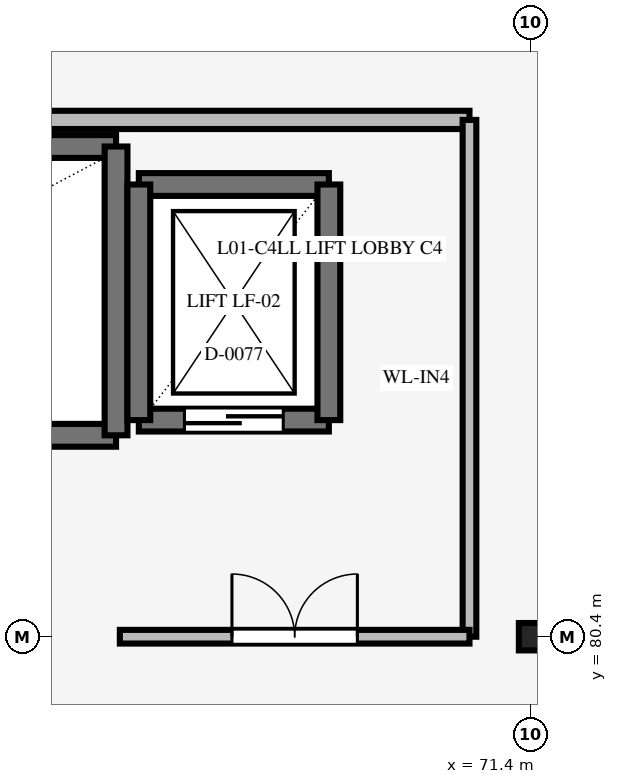
"""IFC4 building model, lengths in metres.
Left out: names, types, materials, properties, quantities, classifications, styles, units other than length and angle.
Written with IfcOpenShell. Run it as: python <this file> out.ifc"""

import sys

from ifc_helpers import new_model, si_unit, direction, frame, frame_2d, origin, origin_2d, place, context, subcontext, project, spatial, rectangle, i_section, extrude, element, fill, save


model = new_model("IFC4")
c1 = context("Model", 3, precision=1e-05, world=origin(), true_north=direction((0.0, 1.0)))
c2 = subcontext(c1, "Body", "Model", "MODEL_VIEW")
j1 = project(units=[si_unit("LENGTHUNIT", "METRE"), si_unit("PLANEANGLEUNIT", "RADIAN")], contexts=[c1])
p1 = place(None, origin())
s1 = spatial("IfcSite", under=j1, at=p1, CompositionType="ELEMENT")
p2 = place(p1, origin())
s2 = spatial("IfcBuilding", under=s1, at=p2, CompositionType="ELEMENT")
p3 = place(p2, frame((0.0, 0.0, 6.0)))
s3 = spatial("IfcBuildingStorey", under=s2, at=p3, CompositionType="ELEMENT", Elevation=6.0)
p4 = place(p3, frame((71.4, 80.4, 0.0), z_axis=(0.0, 0.0, 1.0), x_axis=(1.0, 0.0, 0.0)))
e1 = element("IfcColumn", 1, at=p4, inside=s3, PredefinedType="COLUMN", context=c2, shape_type="SweptSolid", body=[
    extrude(i_section(OverallWidth=0.3, OverallDepth=0.36, WebThickness=0.012, FlangeThickness=0.022, FilletRadius=0.027, at=origin_2d()), origin(), (0.0, 0.0, 1.0), 6.0),
])
for number, where, z_axis, x_axis in (
    (2, (65.95, 83.05, 0.0), (0.0, 0.0, 1.0), (-1.0, 0.0, 0.0)),
    (3, (56.45, 86.85, 0.0), (0.0, 0.0, 1.0), (1.0, 0.0, 0.0)),
):
    element("IfcWall", number, at=place(p3, frame(where, z_axis=z_axis, x_axis=x_axis)), inside=s3, PredefinedType="SHEAR", context=c2, shape_type="SweptSolid", body=[
        extrude(rectangle(XDim=9.5, YDim=0.3, at=frame_2d((4.75, 0.0))), origin(), (0.0, 0.0, 1.0), 6.0),
    ])
p5 = place(p3, frame((65.95, 83.05, 0.0), z_axis=(0.0, 0.0, 1.0), x_axis=(0.0, 1.0, 0.0)))
e4 = element("IfcWall", 4, at=p5, inside=s3, PredefinedType="SHEAR", context=c2, shape_type="SweptSolid", body=[
    extrude(rectangle(XDim=3.8, YDim=0.3, at=frame_2d((1.9, 0.0))), origin(), (0.0, 0.0, 1.0), 6.0),
])
p6 = place(p3, frame((66.25, 83.25, 0.0), z_axis=(0.0, 0.0, 1.0), x_axis=(1.0, 0.0, 0.0)))
e5 = element("IfcWall", 5, at=p6, inside=s3, PredefinedType="SHEAR", context=c2, shape_type="SweptSolid", body=[
    extrude(rectangle(XDim=2.5, YDim=0.3, at=frame_2d((1.25, 0.0))), origin(), (0.0, 0.0, 1.0), 5.64),
])
p7 = place(p6, frame((0.6, 0.0, 0.0)))
e6 = element("IfcOpeningElement", 6, at=p7, cuts=e5, PredefinedType="OPENING", context=c2, shape_type="SweptSolid", body=[
    extrude(rectangle(XDim=1.3, YDim=2.2, at=frame_2d((0.65, 1.1))), frame((0.0, 0.16, 0.0), z_axis=(0.0, -1.0, 0.0), x_axis=(1.0, 0.0, 0.0)), (0.0, 0.0, 1.0), 0.32),
])
p8 = place(p3, frame((66.25, 86.35, 0.0), z_axis=(0.0, 0.0, 1.0), x_axis=(1.0, 0.0, 0.0)))
e7 = element("IfcWall", 7, at=p8, inside=s3, PredefinedType="SHEAR", context=c2, shape_type="SweptSolid", body=[
    extrude(rectangle(XDim=2.5, YDim=0.3, at=frame_2d((1.25, 0.0))), origin(), (0.0, 0.0, 1.0), 5.64),
])
for number, where, z_axis, x_axis in (
    (8, (66.25, 83.25, 0.0), (0.0, 0.0, 1.0), (0.0, 1.0, 0.0)),
    (9, (68.75, 83.25, 0.0), (0.0, 0.0, 1.0), (0.0, 1.0, 0.0)),
):
    element("IfcWall", number, at=place(p3, frame(where, z_axis=z_axis, x_axis=x_axis)), inside=s3, PredefinedType="SHEAR", context=c2, shape_type="SweptSolid", body=[
        extrude(rectangle(XDim=3.1, YDim=0.3, at=frame_2d((1.55, 0.0))), origin(), (0.0, 0.0, 1.0), 5.64),
    ])
p9 = place(p3, frame((54.64, 87.2, 0.0), z_axis=(0.0, 0.0, 1.0), x_axis=(1.0, 0.0, 0.0)))
e10 = element("IfcWall", 10, at=p9, inside=s3, PredefinedType="STANDARD", context=c2, shape_type="SweptSolid", body=[
    extrude(rectangle(XDim=15.96, YDim=0.24, at=frame_2d((7.98, 0.0))), origin(), (0.0, 0.0, 1.0), 3.15),
])
p10 = place(p3, frame((70.6, 80.4, 0.0), z_axis=(0.0, 0.0, 1.0), x_axis=(0.0, 1.0, 0.0)))
e11 = element("IfcWall", 11, at=p10, inside=s3, PredefinedType="STANDARD", context=c2, shape_type="SweptSolid", body=[
    extrude(rectangle(XDim=6.8, YDim=0.18, at=frame_2d((3.4, 0.0))), origin(), (0.0, 0.0, 1.0), 3.15),
])
p11 = place(p3, frame((66.0, 80.4, 0.0), z_axis=(0.0, 0.0, 1.0), x_axis=(1.0, 0.0, 0.0)))
e12 = element("IfcWall", 12, at=p11, inside=s3, PredefinedType="STANDARD", context=c2, shape_type="SweptSolid", body=[
    extrude(rectangle(XDim=4.6, YDim=0.18, at=frame_2d((2.3, 0.0))), origin(), (0.0, 0.0, 1.0), 3.15),
])
p12 = place(p11, frame((1.475, 0.0, 0.0)))
e13 = element("IfcOpeningElement", 13, at=p12, cuts=e12, PredefinedType="OPENING", context=c2, shape_type="SweptSolid", body=[
    extrude(rectangle(XDim=1.65, YDim=2.2, at=frame_2d((0.825, 1.1))), frame((0.0, 0.1, 0.0), z_axis=(0.0, -1.0, 0.0), x_axis=(1.0, 0.0, 0.0)), (0.0, 0.0, 1.0), 0.2),
])
p13 = place(p7, origin())
e14 = element("IfcDoor", 14, at=p13, inside=s3, OperationType="DOUBLE_DOOR_SLIDING", PredefinedType="DOOR", context=c2, shape_type="SweptSolid", body=[
    extrude(rectangle(XDim=1.3, YDim=2.2, at=frame_2d((0.65, 1.1))), frame((0.0, 0.025, 0.0), z_axis=(0.0, -1.0, 0.0), x_axis=(1.0, 0.0, 0.0)), (0.0, 0.0, 1.0), 0.05),
])
fill(e6, e14)
p14 = place(p12, origin())
e15 = element("IfcDoor", 15, at=p14, inside=s3, OperationType="DOUBLE_DOOR_SINGLE_SWING", PredefinedType="DOOR", context=c2, shape_type="SweptSolid", body=[
    extrude(rectangle(XDim=1.65, YDim=2.2, at=frame_2d((0.825, 1.1))), frame((0.0, 0.025, 0.0), z_axis=(0.0, -1.0, 0.0), x_axis=(1.0, 0.0, 0.0)), (0.0, 0.0, 1.0), 0.05),
])
fill(e13, e15)
save(model, sys.argv[1])
